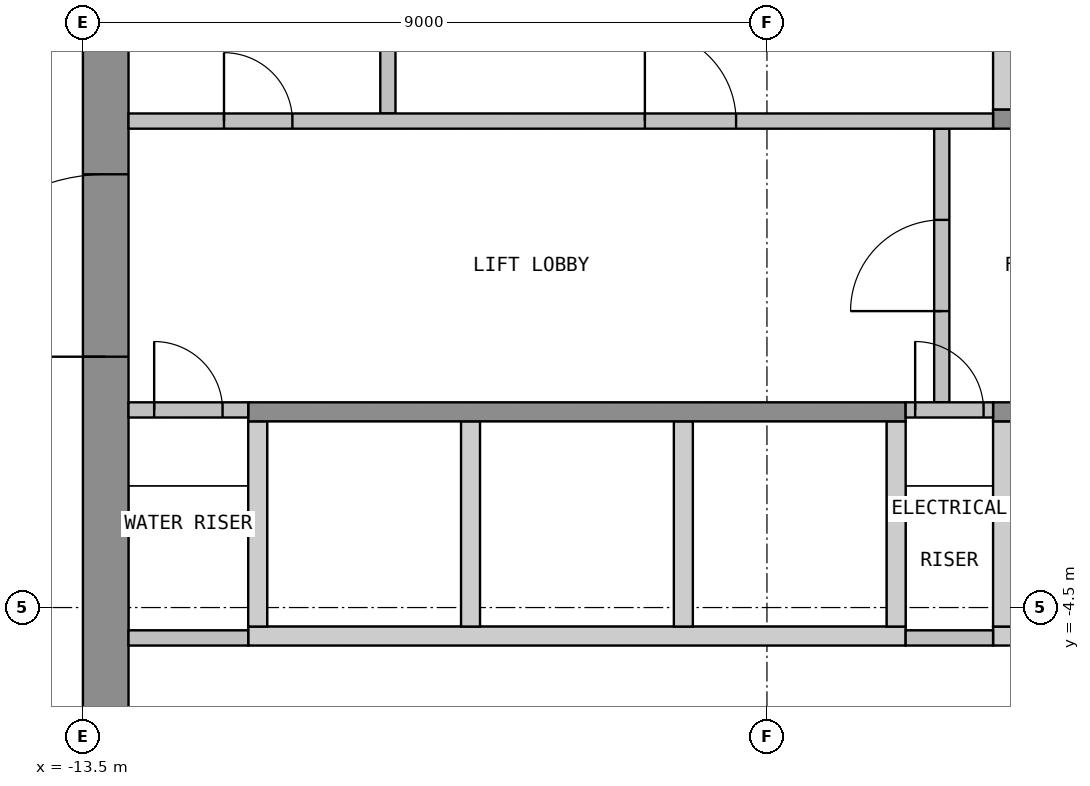
"""IFC4 building model, lengths in metres.
Left out: names, types, materials, properties, quantities, classifications, styles, units other than length and angle.
Written with IfcOpenShell. Run it as: python <this file> out.ifc"""

import sys

from ifc_helpers import new_model, si_unit, direction, frame, frame_2d, origin, place, context, subcontext, project, spatial, polyline, rectangle, outline, extrude, element, fill, save


model = new_model("IFC4")
c1 = context("Model", 3, precision=1e-05, world=origin(), true_north=direction((0.0, 1.0)))
c2 = subcontext(c1, "Body", "Model", "MODEL_VIEW")
j1 = project(units=[si_unit("LENGTHUNIT", "METRE"), si_unit("PLANEANGLEUNIT", "RADIAN")], contexts=[c1])
p1 = place(None, origin())
s1 = spatial("IfcSite", under=j1, at=p1, CompositionType="ELEMENT")
p2 = place(p1, origin())
s2 = spatial("IfcBuilding", under=s1, at=p2, CompositionType="ELEMENT")
p3 = place(p2, frame((0.0, 0.0, 309.9)))
s3 = spatial("IfcBuildingStorey", under=s2, at=p3, CompositionType="ELEMENT", Elevation=309.9)
p4 = place(p3, frame((-13.2, -10.65, 0.0), z_axis=(0.0, 0.0, 1.0), x_axis=(0.0, 1.0, 0.0)))
e1 = element("IfcWall", 1, at=p4, inside=s3, PredefinedType="SHEAR", context=c2, shape_type="SweptSolid", body=[
    extrude(rectangle(XDim=21.3, YDim=0.6, at=frame_2d((10.65, 0.0))), origin(), (0.0, 0.0, 1.0), 8.55),
])
p5 = place(p4, frame((9.45, 0.0, 0.0)))
e2 = element("IfcOpeningElement", 2, at=p5, cuts=e1, PredefinedType="OPENING", context=c2, shape_type="SweptSolid", body=[
    extrude(rectangle(XDim=2.4, YDim=2.1, at=frame_2d((1.2, 1.05))), frame((0.0, 0.31, 0.0), z_axis=(0.0, -1.0, 0.0), x_axis=(1.0, 0.0, 0.0)), (0.0, 0.0, 1.0), 0.62),
])
p6 = place(p3, origin())
e3 = element("IfcWall", 3, at=p6, inside=s3, PredefinedType="SHEAR", context=c2, shape_type="SweptSolid", body=[
    extrude(outline(polyline([(-1.525, 2.05), (-1.275, 2.05), (-1.275, 4.75), (-1.525, 4.75), (-1.525, 2.05)])), origin(), (0.0, 0.0, 1.0), 8.55),
])
p7 = place(p3, frame((-1.525, 1.925, 0.0), z_axis=(0.0, 0.0, 1.0), x_axis=(1.0, 0.0, 0.0)))
e4 = element("IfcWall", 4, at=p7, inside=s3, PredefinedType="SHEAR", context=c2, shape_type="SweptSolid", body=[
    extrude(rectangle(XDim=3.05, YDim=0.25, at=frame_2d((1.525, 0.0))), origin(), (0.0, 0.0, 1.0), 8.55),
])
p8 = place(p7, frame((0.925, 0.0, 0.0)))
e5 = element("IfcOpeningElement", 5, at=p8, cuts=e4, PredefinedType="OPENING", context=c2, shape_type="SweptSolid", body=[
    extrude(rectangle(XDim=1.2, YDim=2.1, at=frame_2d((0.6, 1.05))), frame((0.0, 0.135, 0.0), z_axis=(0.0, -1.0, 0.0), x_axis=(1.0, 0.0, 0.0)), (0.0, 0.0, 1.0), 0.27),
])
p9 = place(p3, origin())
e6 = element("IfcWall", 6, at=p9, inside=s3, PredefinedType="SHEAR", context=c2, shape_type="SweptSolid", body=[
    extrude(outline(polyline([(-11.325, -5.0), (-2.675, -5.0), (-2.675, -4.75), (-11.325, -4.75), (-11.325, -5.0)])), origin(), (0.0, 0.0, 1.0), 8.55),
])
p10 = place(p3, origin())
e7 = element("IfcWall", 7, at=p10, inside=s3, PredefinedType="SHEAR", context=c2, shape_type="SweptSolid", body=[
    extrude(outline(polyline([(-1.525, -5.0), (4.325, -5.0), (4.325, -4.75), (-1.525, -4.75), (-1.525, -5.0)])), origin(), (0.0, 0.0, 1.0), 8.55),
])
p11 = place(p3, origin())
e8 = element("IfcWall", 8, at=p11, inside=s3, PredefinedType="SHEAR", context=c2, shape_type="SweptSolid", body=[
    extrude(outline(polyline([(-11.325, -4.75), (-11.075, -4.75), (-11.075, -2.05), (-11.325, -2.05), (-11.325, -4.75)])), origin(), (0.0, 0.0, 1.0), 8.55),
])
p12 = place(p3, origin())
e9 = element("IfcWall", 9, at=p12, inside=s3, PredefinedType="SHEAR", context=c2, shape_type="SweptSolid", body=[
    extrude(outline(polyline([(-8.525, -4.75), (-8.275, -4.75), (-8.275, -2.05), (-8.525, -2.05), (-8.525, -4.75)])), origin(), (0.0, 0.0, 1.0), 8.55),
])
p13 = place(p3, origin())
e10 = element("IfcWall", 10, at=p13, inside=s3, PredefinedType="SHEAR", context=c2, shape_type="SweptSolid", body=[
    extrude(outline(polyline([(-5.725, -4.75), (-5.475, -4.75), (-5.475, -2.05), (-5.725, -2.05), (-5.725, -4.75)])), origin(), (0.0, 0.0, 1.0), 8.55),
])
p14 = place(p3, origin())
e11 = element("IfcWall", 11, at=p14, inside=s3, PredefinedType="SHEAR", context=c2, shape_type="SweptSolid", body=[
    extrude(outline(polyline([(-2.925, -4.75), (-2.675, -4.75), (-2.675, -2.05), (-2.925, -2.05), (-2.925, -4.75)])), origin(), (0.0, 0.0, 1.0), 8.55),
])
p15 = place(p3, origin())
e12 = element("IfcWall", 12, at=p15, inside=s3, PredefinedType="SHEAR", context=c2, shape_type="SweptSolid", body=[
    extrude(outline(polyline([(-1.525, -4.75), (-1.275, -4.75), (-1.275, -2.05), (-1.525, -2.05), (-1.525, -4.75)])), origin(), (0.0, 0.0, 1.0), 8.55),
])
p16 = place(p3, frame((-11.325, -1.925, 0.0), z_axis=(0.0, 0.0, 1.0), x_axis=(1.0, 0.0, 0.0)))
e13 = element("IfcWall", 13, at=p16, inside=s3, PredefinedType="SHEAR", context=c2, shape_type="SweptSolid", body=[
    extrude(rectangle(XDim=8.65, YDim=0.25, at=frame_2d((4.325, 0.0))), origin(), (0.0, 0.0, 1.0), 8.55),
])
p17 = place(p3, frame((-1.525, -1.925, 0.0), z_axis=(0.0, 0.0, 1.0), x_axis=(1.0, 0.0, 0.0)))
e14 = element("IfcWall", 14, at=p17, inside=s3, PredefinedType="SHEAR", context=c2, shape_type="SweptSolid", body=[
    extrude(rectangle(XDim=5.85, YDim=0.25, at=frame_2d((2.925, 0.0))), origin(), (0.0, 0.0, 1.0), 8.55),
])
p18 = place(p17, frame((0.925, 0.0, 0.0)))
e15 = element("IfcOpeningElement", 15, at=p18, cuts=e14, PredefinedType="OPENING", context=c2, shape_type="SweptSolid", body=[
    extrude(rectangle(XDim=1.2, YDim=2.1, at=frame_2d((0.6, 1.05))), frame((0.0, 0.135, 0.0), z_axis=(0.0, -1.0, 0.0), x_axis=(1.0, 0.0, 0.0)), (0.0, 0.0, 1.0), 0.27),
])
p19 = place(p3, frame((-2.2, -1.8, 0.0), z_axis=(0.0, 0.0, 1.0), x_axis=(0.0, 1.0, 0.0)))
e16 = element("IfcWall", 16, at=p19, inside=s3, PredefinedType="PARTITIONING", context=c2, shape_type="SweptSolid", body=[
    extrude(rectangle(XDim=3.6, YDim=0.2, at=frame_2d((1.8, 0.0))), origin(), (0.0, 0.0, 1.0), 8.55),
])
p20 = place(p19, frame((1.2, 0.0, 0.0)))
e17 = element("IfcOpeningElement", 17, at=p20, cuts=e16, PredefinedType="OPENING", context=c2, shape_type="SweptSolid", body=[
    extrude(rectangle(XDim=1.2, YDim=2.1, at=frame_2d((0.6, 1.05))), frame((0.0, 0.11, 0.0), z_axis=(0.0, -1.0, 0.0), x_axis=(1.0, 0.0, 0.0)), (0.0, 0.0, 1.0), 0.22),
])
p21 = place(p3, frame((-9.488, 2.0, 0.0), z_axis=(0.0, 0.0, 1.0), x_axis=(0.0, 1.0, 0.0)))
e18 = element("IfcWall", 18, at=p21, inside=s3, PredefinedType="PARTITIONING", context=c2, shape_type="SweptSolid", body=[
    extrude(rectangle(XDim=2.8, YDim=0.2, at=frame_2d((1.4, 0.0))), origin(), (0.0, 0.0, 1.0), 8.55),
])
p22 = place(p3, frame((-12.9, 1.9, 0.0), z_axis=(0.0, 0.0, 1.0), x_axis=(1.0, 0.0, 0.0)))
e19 = element("IfcWall", 19, at=p22, inside=s3, PredefinedType="PARTITIONING", context=c2, shape_type="SweptSolid", body=[
    extrude(rectangle(XDim=11.375, YDim=0.2, at=frame_2d((5.688, 0.0))), origin(), (0.0, 0.0, 1.0), 8.55),
])
p23 = place(p22, frame((1.256, 0.0, 0.0)))
e20 = element("IfcOpeningElement", 20, at=p23, cuts=e19, PredefinedType="OPENING", context=c2, shape_type="SweptSolid", body=[
    extrude(rectangle(XDim=0.9, YDim=2.1, at=frame_2d((0.45, 1.05))), frame((0.0, 0.11, 0.0), z_axis=(0.0, -1.0, 0.0), x_axis=(1.0, 0.0, 0.0)), (0.0, 0.0, 1.0), 0.22),
])
p24 = place(p22, frame((6.794, 0.0, 0.0)))
e21 = element("IfcOpeningElement", 21, at=p24, cuts=e19, PredefinedType="OPENING", context=c2, shape_type="SweptSolid", body=[
    extrude(rectangle(XDim=1.2, YDim=2.1, at=frame_2d((0.6, 1.05))), frame((0.0, 0.11, 0.0), z_axis=(0.0, -1.0, 0.0), x_axis=(1.0, 0.0, 0.0)), (0.0, 0.0, 1.0), 0.22),
])
p25 = place(p3, frame((-12.9, -1.9, 0.0), z_axis=(0.0, 0.0, 1.0), x_axis=(1.0, 0.0, 0.0)))
e22 = element("IfcWall", 22, at=p25, inside=s3, PredefinedType="PARTITIONING", context=c2, shape_type="SweptSolid", body=[
    extrude(rectangle(XDim=1.575, YDim=0.2, at=frame_2d((0.788, 0.0))), origin(), (0.0, 0.0, 1.0), 8.55),
])
p26 = place(p25, frame((0.337, 0.0, 0.0)))
e23 = element("IfcOpeningElement", 23, at=p26, cuts=e22, PredefinedType="OPENING", context=c2, shape_type="SweptSolid", body=[
    extrude(rectangle(XDim=0.9, YDim=2.1, at=frame_2d((0.45, 1.05))), frame((0.0, 0.11, 0.0), z_axis=(0.0, -1.0, 0.0), x_axis=(1.0, 0.0, 0.0)), (0.0, 0.0, 1.0), 0.22),
])
p27 = place(p3, frame((-12.9, -4.9, 0.0), z_axis=(0.0, 0.0, 1.0), x_axis=(1.0, 0.0, 0.0)))
e24 = element("IfcWall", 24, at=p27, inside=s3, PredefinedType="PARTITIONING", context=c2, shape_type="SweptSolid", body=[
    extrude(rectangle(XDim=1.575, YDim=0.2, at=frame_2d((0.788, 0.0))), origin(), (0.0, 0.0, 1.0), 8.55),
])
p28 = place(p3, frame((-2.675, -1.9, 0.0), z_axis=(0.0, 0.0, 1.0), x_axis=(1.0, 0.0, 0.0)))
e25 = element("IfcWall", 25, at=p28, inside=s3, PredefinedType="PARTITIONING", context=c2, shape_type="SweptSolid", body=[
    extrude(rectangle(XDim=1.15, YDim=0.2, at=frame_2d((0.575, 0.0))), origin(), (0.0, 0.0, 1.0), 8.55),
])
p29 = place(p28, frame((0.125, 0.0, 0.0)))
e26 = element("IfcOpeningElement", 26, at=p29, cuts=e25, PredefinedType="OPENING", context=c2, shape_type="SweptSolid", body=[
    extrude(rectangle(XDim=0.9, YDim=2.1, at=frame_2d((0.45, 1.05))), frame((0.0, 0.11, 0.0), z_axis=(0.0, -1.0, 0.0), x_axis=(1.0, 0.0, 0.0)), (0.0, 0.0, 1.0), 0.22),
])
p30 = place(p3, frame((-2.675, -4.9, 0.0), z_axis=(0.0, 0.0, 1.0), x_axis=(1.0, 0.0, 0.0)))
e27 = element("IfcWall", 27, at=p30, inside=s3, PredefinedType="PARTITIONING", context=c2, shape_type="SweptSolid", body=[
    extrude(rectangle(XDim=1.15, YDim=0.2, at=frame_2d((0.575, 0.0))), origin(), (0.0, 0.0, 1.0), 8.55),
])
p31 = place(p5, origin())
e28 = element("IfcDoor", 28, at=p31, inside=s3, OperationType="DOUBLE_DOOR_DOUBLE_SWING", PredefinedType="DOOR", context=c2, shape_type="SweptSolid", body=[
    extrude(rectangle(XDim=2.4, YDim=2.1, at=frame_2d((1.2, 1.05))), frame((0.0, 0.025, 0.0), z_axis=(0.0, -1.0, 0.0), x_axis=(1.0, 0.0, 0.0)), (0.0, 0.0, 1.0), 0.05),
])
fill(e2, e28)
p32 = place(p20, origin())
e29 = element("IfcDoor", 29, at=p32, inside=s3, OperationType="SINGLE_SWING_LEFT", PredefinedType="DOOR", context=c2, shape_type="SweptSolid", body=[
    extrude(rectangle(XDim=1.2, YDim=2.1, at=frame_2d((0.6, 1.05))), frame((0.0, 0.025, 0.0), z_axis=(0.0, -1.0, 0.0), x_axis=(1.0, 0.0, 0.0)), (0.0, 0.0, 1.0), 0.05),
])
fill(e17, e29)
p33 = place(p23, origin())
e30 = element("IfcDoor", 30, at=p33, inside=s3, OperationType="SINGLE_SWING_LEFT", PredefinedType="DOOR", context=c2, shape_type="SweptSolid", body=[
    extrude(rectangle(XDim=0.9, YDim=2.1, at=frame_2d((0.45, 1.05))), frame((0.0, 0.025, 0.0), z_axis=(0.0, -1.0, 0.0), x_axis=(1.0, 0.0, 0.0)), (0.0, 0.0, 1.0), 0.05),
])
fill(e20, e30)
p34 = place(p24, origin())
e31 = element("IfcDoor", 31, at=p34, inside=s3, OperationType="SINGLE_SWING_RIGHT", PredefinedType="DOOR", context=c2, shape_type="SweptSolid", body=[
    extrude(rectangle(XDim=1.2, YDim=2.1, at=frame_2d((0.6, 1.05))), frame((0.0, 0.025, 0.0), z_axis=(0.0, -1.0, 0.0), x_axis=(1.0, 0.0, 0.0)), (0.0, 0.0, 1.0), 0.05),
])
fill(e21, e31)
p35 = place(p26, origin())
e32 = element("IfcDoor", 32, at=p35, inside=s3, OperationType="SINGLE_SWING_LEFT", PredefinedType="DOOR", context=c2, shape_type="SweptSolid", body=[
    extrude(rectangle(XDim=0.9, YDim=2.1, at=frame_2d((0.45, 1.05))), frame((0.0, 0.025, 0.0), z_axis=(0.0, -1.0, 0.0), x_axis=(1.0, 0.0, 0.0)), (0.0, 0.0, 1.0), 0.05),
])
fill(e23, e32)
p36 = place(p29, origin())
e33 = element("IfcDoor", 33, at=p36, inside=s3, OperationType="SINGLE_SWING_LEFT", PredefinedType="DOOR", context=c2, shape_type="SweptSolid", body=[
    extrude(rectangle(XDim=0.9, YDim=2.1, at=frame_2d((0.45, 1.05))), frame((0.0, 0.025, 0.0), z_axis=(0.0, -1.0, 0.0), x_axis=(1.0, 0.0, 0.0)), (0.0, 0.0, 1.0), 0.05),
])
fill(e26, e33)
save(model, sys.argv[1])
